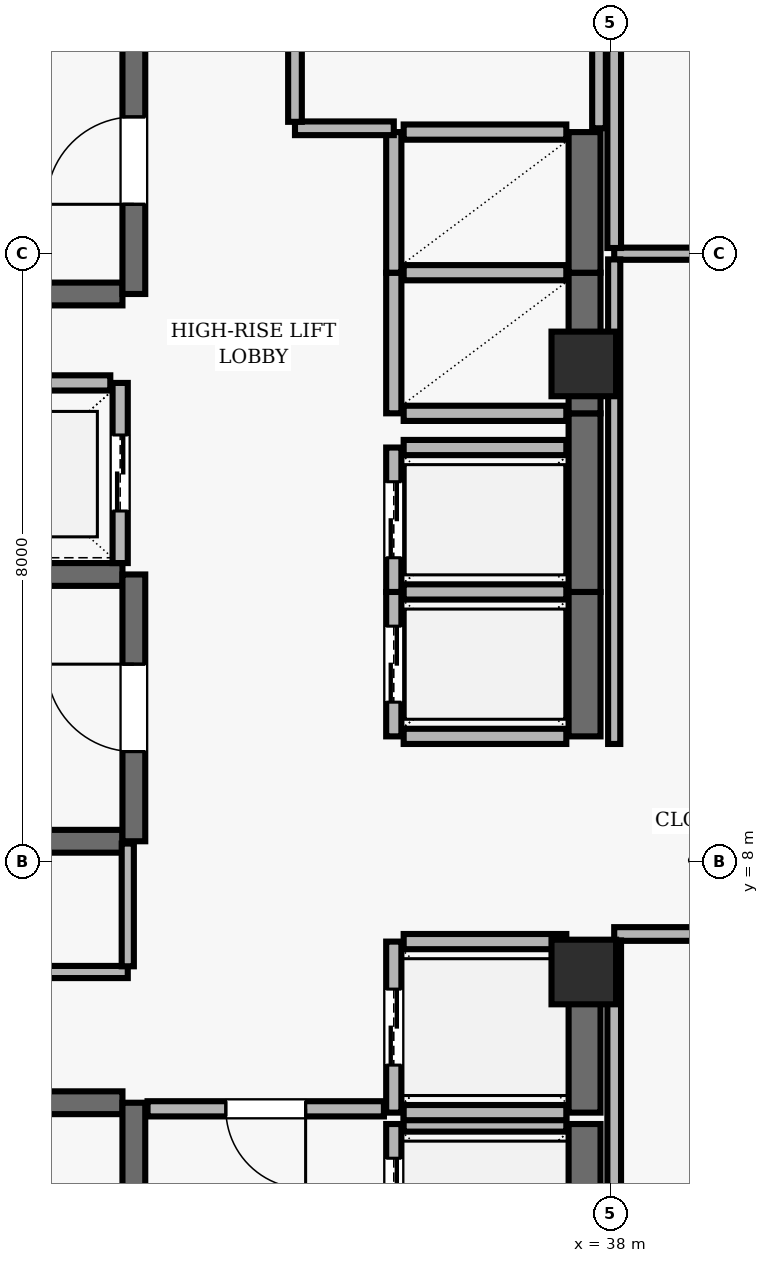
"""IFC4 building model, lengths in metres.
Left out: names, types, materials, properties, quantities, classifications, styles, units other than length and angle.
Written with IfcOpenShell. Run it as: python <this file> out.ifc"""

import sys

from ifc_helpers import new_model, si_unit, direction, frame, frame_2d, origin, origin_2d, place, context, subcontext, project, spatial, rectangle, extrude, element, fill, save


model = new_model("IFC4")
c1 = context("Model", 3, precision=1e-05, world=origin(), true_north=direction((0.0, 1.0)))
c2 = subcontext(c1, "Body", "Model", "MODEL_VIEW")
j1 = project(units=[si_unit("LENGTHUNIT", "METRE"), si_unit("PLANEANGLEUNIT", "RADIAN")], contexts=[c1])
p1 = place(None, origin())
s1 = spatial("IfcSite", under=j1, at=p1, CompositionType="ELEMENT")
p2 = place(p1, origin())
s2 = spatial("IfcBuilding", under=s1, at=p2, CompositionType="ELEMENT")
p3 = place(p2, frame((0.0, 0.0, 263.8)))
s3 = spatial("IfcBuildingStorey", under=s2, at=p3, CompositionType="ELEMENT", Elevation=263.8)
for number, where, z_axis, x_axis in (
    (1, (37.65, 6.55, 0.0), (0.0, 0.0, 1.0), (1.0, 0.0, 0.0)),
    (2, (37.65, 14.55, 0.0), (0.0, 0.0, 1.0), (1.0, 0.0, 0.0)),
):
    element("IfcColumn", number, at=place(p3, frame(where, z_axis=z_axis, x_axis=x_axis)), inside=s3, PredefinedType="COLUMN", context=c2, shape_type="SweptSolid", body=[
        extrude(rectangle(XDim=0.85, YDim=0.85, at=origin_2d()), origin(), (0.0, 0.0, 1.0), 3.9),
    ])
p4 = place(p3, frame((31.58, 4.83, 0.0), z_axis=(0.0, 0.0, 1.0), x_axis=(-1.0, 0.0, 0.0)))
e3 = element("IfcWall", 3, at=p4, inside=s3, PredefinedType="SHEAR", context=c2, shape_type="SweptSolid", body=[
    extrude(rectangle(XDim=8.36, YDim=0.3, at=frame_2d((4.18, 0.0))), origin(), (0.0, 0.0, 1.0), 3.69),
])
p5 = place(p3, frame((31.73, 0.96, 0.0), z_axis=(0.0, 0.0, 1.0), x_axis=(0.0, 1.0, 0.0)))
e4 = element("IfcWall", 4, at=p5, inside=s3, PredefinedType="SHEAR", context=c2, shape_type="SweptSolid", body=[
    extrude(rectangle(XDim=3.87, YDim=0.3, at=frame_2d((1.935, 0.0))), origin(), (0.0, 0.0, 1.0), 3.69),
])
p6 = place(p5, frame((1.54, 0.0, 0.0)))
e5 = element("IfcOpeningElement", 5, at=p6, cuts=e4, PredefinedType="OPENING", context=c2, shape_type="SweptSolid", body=[
    extrude(rectangle(XDim=1.15, YDim=2.15, at=frame_2d((0.575, 1.075))), frame((0.0, 0.16, 0.0), z_axis=(0.0, -1.0, 0.0), x_axis=(1.0, 0.0, 0.0)), (0.0, 0.0, 1.0), 0.32),
])
p7 = place(p3, frame((23.22, 15.47, 0.0), z_axis=(0.0, 0.0, 1.0), x_axis=(1.0, 0.0, 0.0)))
e6 = element("IfcWall", 6, at=p7, inside=s3, PredefinedType="SHEAR", context=c2, shape_type="SweptSolid", body=[
    extrude(rectangle(XDim=8.36, YDim=0.3, at=frame_2d((4.18, 0.0))), origin(), (0.0, 0.0, 1.0), 3.69),
])
p8 = place(p3, frame((31.73, 15.47, 0.0), z_axis=(0.0, 0.0, 1.0), x_axis=(0.0, 1.0, 0.0)))
e7 = element("IfcWall", 7, at=p8, inside=s3, PredefinedType="SHEAR", context=c2, shape_type="SweptSolid", body=[
    extrude(rectangle(XDim=3.51, YDim=0.3, at=frame_2d((1.755, 0.0))), origin(), (0.0, 0.0, 1.0), 3.69),
])
p9 = place(p8, frame((1.18, 0.0, 0.0)))
e8 = element("IfcOpeningElement", 8, at=p9, cuts=e7, PredefinedType="OPENING", context=c2, shape_type="SweptSolid", body=[
    extrude(rectangle(XDim=1.15, YDim=2.15, at=frame_2d((0.575, 1.075))), frame((0.0, 0.16, 0.0), z_axis=(0.0, -1.0, 0.0), x_axis=(1.0, 0.0, 0.0)), (0.0, 0.0, 1.0), 0.32),
])
for number, where, z_axis, x_axis in (
    (9, (31.58, 11.78, 0.0), (0.0, 0.0, 1.0), (-1.0, 0.0, 0.0)),
    (10, (23.22, 8.27, 0.0), (0.0, 0.0, 1.0), (1.0, 0.0, 0.0)),
):
    element("IfcWall", number, at=place(p3, frame(where, z_axis=z_axis, x_axis=x_axis)), inside=s3, PredefinedType="SHEAR", context=c2, shape_type="SweptSolid", body=[
        extrude(rectangle(XDim=8.36, YDim=0.3, at=frame_2d((4.18, 0.0))), origin(), (0.0, 0.0, 1.0), 3.69),
    ])
p10 = place(p3, frame((31.73, 8.27, 0.0), z_axis=(0.0, 0.0, 1.0), x_axis=(0.0, 1.0, 0.0)))
e11 = element("IfcWall", 11, at=p10, inside=s3, PredefinedType="SHEAR", context=c2, shape_type="SweptSolid", body=[
    extrude(rectangle(XDim=3.51, YDim=0.3, at=frame_2d((1.755, 0.0))), origin(), (0.0, 0.0, 1.0), 3.69),
])
p11 = place(p10, frame((1.18, 0.0, 0.0)))
e12 = element("IfcOpeningElement", 12, at=p11, cuts=e11, PredefinedType="OPENING", context=c2, shape_type="SweptSolid", body=[
    extrude(rectangle(XDim=1.15, YDim=2.15, at=frame_2d((0.575, 1.075))), frame((0.0, 0.16, 0.0), z_axis=(0.0, -1.0, 0.0), x_axis=(1.0, 0.0, 0.0)), (0.0, 0.0, 1.0), 0.32),
])
p12 = place(p3, frame((35.15, 4.55, 0.0), z_axis=(0.0, 0.0, 1.0), x_axis=(0.0, -1.0, 0.0)))
e13 = element("IfcWall", 13, at=p12, inside=s3, PredefinedType="SOLIDWALL", context=c2, shape_type="SweptSolid", body=[
    extrude(rectangle(XDim=2.1, YDim=0.2, at=frame_2d((1.05, 0.0))), origin(), (0.0, 0.0, 1.0), 3.69),
])
p13 = place(p12, frame((0.45, 0.0, 0.0)))
e14 = element("IfcOpeningElement", 14, at=p13, cuts=e13, PredefinedType="OPENING", context=c2, shape_type="SweptSolid", body=[
    extrude(rectangle(XDim=1.2, YDim=2.15, at=frame_2d((0.6, 1.075))), frame((0.0, 0.11, 0.0), z_axis=(0.0, -1.0, 0.0), x_axis=(1.0, 0.0, 0.0)), (0.0, 0.0, 1.0), 0.22),
])
p14 = place(p3, frame((37.66, 2.45, 0.0), z_axis=(0.0, 0.0, 1.0), x_axis=(0.0, 1.0, 0.0)))
e15 = element("IfcWall", 15, at=p14, inside=s3, PredefinedType="SHEAR", context=c2, shape_type="SweptSolid", body=[
    extrude(rectangle(XDim=2.1, YDim=0.42, at=frame_2d((1.05, 0.0))), origin(), (0.0, 0.0, 1.0), 3.69),
])
p15 = place(p3, frame((37.42, 4.55, 0.0), z_axis=(0.0, 0.0, 1.0), x_axis=(-1.0, 0.0, 0.0)))
e16 = element("IfcWall", 16, at=p15, inside=s3, PredefinedType="SOLIDWALL", context=c2, shape_type="SweptSolid", body=[
    extrude(rectangle(XDim=2.14, YDim=0.2, at=frame_2d((1.07, 0.0))), origin(), (0.0, 0.0, 1.0), 3.69),
])
p16 = place(p3, frame((35.15, 6.95, 0.0), z_axis=(0.0, 0.0, 1.0), x_axis=(0.0, -1.0, 0.0)))
e17 = element("IfcWall", 17, at=p16, inside=s3, PredefinedType="SOLIDWALL", context=c2, shape_type="SweptSolid", body=[
    extrude(rectangle(XDim=2.25, YDim=0.2, at=frame_2d((1.125, 0.0))), origin(), (0.0, 0.0, 1.0), 3.69),
])
p17 = place(p16, frame((0.625, 0.0, 0.0)))
e18 = element("IfcOpeningElement", 18, at=p17, cuts=e17, PredefinedType="OPENING", context=c2, shape_type="SweptSolid", body=[
    extrude(rectangle(XDim=1.0, YDim=2.1, at=frame_2d((0.5, 1.05))), frame((0.0, 0.11, 0.0), z_axis=(0.0, -1.0, 0.0), x_axis=(1.0, 0.0, 0.0)), (0.0, 0.0, 1.0), 0.22),
])
p18 = place(p3, frame((37.66, 4.7, 0.0), z_axis=(0.0, 0.0, 1.0), x_axis=(0.0, 1.0, 0.0)))
e19 = element("IfcWall", 19, at=p18, inside=s3, PredefinedType="SHEAR", context=c2, shape_type="SweptSolid", body=[
    extrude(rectangle(XDim=2.25, YDim=0.42, at=frame_2d((1.125, 0.0))), origin(), (0.0, 0.0, 1.0), 3.69),
])
for number, where, z_axis, x_axis in (
    (20, (35.28, 4.7, 0.0), (0.0, 0.0, 1.0), (1.0, 0.0, 0.0)),
    (21, (37.42, 6.95, 0.0), (0.0, 0.0, 1.0), (-1.0, 0.0, 0.0)),
):
    element("IfcWall", number, at=place(p3, frame(where, z_axis=z_axis, x_axis=x_axis)), inside=s3, PredefinedType="SOLIDWALL", context=c2, shape_type="SweptSolid", body=[
        extrude(rectangle(XDim=2.14, YDim=0.2, at=frame_2d((1.07, 0.0))), origin(), (0.0, 0.0, 1.0), 3.69),
    ])
p19 = place(p3, frame((35.15, 11.55, 0.0), z_axis=(0.0, 0.0, 1.0), x_axis=(0.0, -1.0, 0.0)))
e22 = element("IfcWall", 22, at=p19, inside=s3, PredefinedType="SOLIDWALL", context=c2, shape_type="SweptSolid", body=[
    extrude(rectangle(XDim=1.9, YDim=0.2, at=frame_2d((0.95, 0.0))), origin(), (0.0, 0.0, 1.0), 3.69),
])
p20 = place(p19, frame((0.45, 0.0, 0.0)))
e23 = element("IfcOpeningElement", 23, at=p20, cuts=e22, PredefinedType="OPENING", context=c2, shape_type="SweptSolid", body=[
    extrude(rectangle(XDim=1.0, YDim=2.1, at=frame_2d((0.5, 1.05))), frame((0.0, 0.11, 0.0), z_axis=(0.0, -1.0, 0.0), x_axis=(1.0, 0.0, 0.0)), (0.0, 0.0, 1.0), 0.22),
])
p21 = place(p3, frame((37.66, 9.65, 0.0), z_axis=(0.0, 0.0, 1.0), x_axis=(0.0, 1.0, 0.0)))
e24 = element("IfcWall", 24, at=p21, inside=s3, PredefinedType="SHEAR", context=c2, shape_type="SweptSolid", body=[
    extrude(rectangle(XDim=1.9, YDim=0.42, at=frame_2d((0.95, 0.0))), origin(), (0.0, 0.0, 1.0), 3.69),
])
for number, where, z_axis, x_axis in (
    (25, (35.28, 9.65, 0.0), (0.0, 0.0, 1.0), (1.0, 0.0, 0.0)),
    (26, (37.42, 11.55, 0.0), (0.0, 0.0, 1.0), (-1.0, 0.0, 0.0)),
):
    element("IfcWall", number, at=place(p3, frame(where, z_axis=z_axis, x_axis=x_axis)), inside=s3, PredefinedType="SOLIDWALL", context=c2, shape_type="SweptSolid", body=[
        extrude(rectangle(XDim=2.14, YDim=0.2, at=frame_2d((1.07, 0.0))), origin(), (0.0, 0.0, 1.0), 3.69),
    ])
p22 = place(p3, frame((35.15, 13.45, 0.0), z_axis=(0.0, 0.0, 1.0), x_axis=(0.0, -1.0, 0.0)))
e27 = element("IfcWall", 27, at=p22, inside=s3, PredefinedType="SOLIDWALL", context=c2, shape_type="SweptSolid", body=[
    extrude(rectangle(XDim=1.9, YDim=0.2, at=frame_2d((0.95, 0.0))), origin(), (0.0, 0.0, 1.0), 3.69),
])
p23 = place(p22, frame((0.45, 0.0, 0.0)))
e28 = element("IfcOpeningElement", 28, at=p23, cuts=e27, PredefinedType="OPENING", context=c2, shape_type="SweptSolid", body=[
    extrude(rectangle(XDim=1.0, YDim=2.1, at=frame_2d((0.5, 1.05))), frame((0.0, 0.11, 0.0), z_axis=(0.0, -1.0, 0.0), x_axis=(1.0, 0.0, 0.0)), (0.0, 0.0, 1.0), 0.22),
])
p24 = place(p3, frame((37.66, 11.55, 0.0), z_axis=(0.0, 0.0, 1.0), x_axis=(0.0, 1.0, 0.0)))
e29 = element("IfcWall", 29, at=p24, inside=s3, PredefinedType="SHEAR", context=c2, shape_type="SweptSolid", body=[
    extrude(rectangle(XDim=2.35, YDim=0.42, at=frame_2d((1.175, 0.0))), origin(), (0.0, 0.0, 1.0), 3.69),
])
p25 = place(p3, frame((37.42, 13.45, 0.0), z_axis=(0.0, 0.0, 1.0), x_axis=(-1.0, 0.0, 0.0)))
e30 = element("IfcWall", 30, at=p25, inside=s3, PredefinedType="SOLIDWALL", context=c2, shape_type="SweptSolid", body=[
    extrude(rectangle(XDim=2.14, YDim=0.2, at=frame_2d((1.07, 0.0))), origin(), (0.0, 0.0, 1.0), 3.69),
])
p26 = place(p3, frame((31.55, 11.93, 0.0), z_axis=(0.0, 0.0, 1.0), x_axis=(0.0, 1.0, 0.0)))
e31 = element("IfcWall", 31, at=p26, inside=s3, PredefinedType="SOLIDWALL", context=c2, shape_type="SweptSolid", body=[
    extrude(rectangle(XDim=2.37, YDim=0.2, at=frame_2d((1.185, 0.0))), origin(), (0.0, 0.0, 1.0), 3.69),
])
p27 = place(p26, frame((0.685, 0.0, 0.0)))
e32 = element("IfcOpeningElement", 32, at=p27, cuts=e31, PredefinedType="OPENING", context=c2, shape_type="SweptSolid", body=[
    extrude(rectangle(XDim=1.0, YDim=2.1, at=frame_2d((0.5, 1.05))), frame((0.0, 0.11, 0.0), z_axis=(0.0, -1.0, 0.0), x_axis=(1.0, 0.0, 0.0)), (0.0, 0.0, 1.0), 0.22),
])
p28 = place(p3, frame((31.42, 14.3, 0.0), z_axis=(0.0, 0.0, 1.0), x_axis=(-1.0, 0.0, 0.0)))
e33 = element("IfcWall", 33, at=p28, inside=s3, PredefinedType="SOLIDWALL", context=c2, shape_type="SweptSolid", body=[
    extrude(rectangle(XDim=2.44, YDim=0.2, at=frame_2d((1.22, 0.0))), origin(), (0.0, 0.0, 1.0), 3.69),
])
p29 = place(p3, frame((35.15, 15.75, 0.0), z_axis=(0.0, 0.0, 1.0), x_axis=(0.0, -1.0, 0.0)))
e34 = element("IfcWall", 34, at=p29, inside=s3, PredefinedType="SOLIDWALL", context=c2, shape_type="SweptSolid", body=[
    extrude(rectangle(XDim=1.85, YDim=0.2, at=frame_2d((0.925, 0.0))), origin(), (0.0, 0.0, 1.0), 3.69),
])
p30 = place(p3, frame((37.66, 13.9, 0.0), z_axis=(0.0, 0.0, 1.0), x_axis=(0.0, 1.0, 0.0)))
e35 = element("IfcWall", 35, at=p30, inside=s3, PredefinedType="SHEAR", context=c2, shape_type="SweptSolid", body=[
    extrude(rectangle(XDim=1.85, YDim=0.42, at=frame_2d((0.925, 0.0))), origin(), (0.0, 0.0, 1.0), 3.69),
])
for number, where, z_axis, x_axis in (
    (36, (35.28, 13.9, 0.0), (0.0, 0.0, 1.0), (1.0, 0.0, 0.0)),
    (37, (37.42, 15.75, 0.0), (0.0, 0.0, 1.0), (-1.0, 0.0, 0.0)),
):
    element("IfcWall", number, at=place(p3, frame(where, z_axis=z_axis, x_axis=x_axis)), inside=s3, PredefinedType="SOLIDWALL", context=c2, shape_type="SweptSolid", body=[
        extrude(rectangle(XDim=2.14, YDim=0.2, at=frame_2d((1.07, 0.0))), origin(), (0.0, 0.0, 1.0), 3.69),
    ])
p31 = place(p3, frame((35.15, 17.6, 0.0), z_axis=(0.0, 0.0, 1.0), x_axis=(0.0, -1.0, 0.0)))
e38 = element("IfcWall", 38, at=p31, inside=s3, PredefinedType="SOLIDWALL", context=c2, shape_type="SweptSolid", body=[
    extrude(rectangle(XDim=1.85, YDim=0.2, at=frame_2d((0.925, 0.0))), origin(), (0.0, 0.0, 1.0), 3.69),
])
p32 = place(p3, frame((37.66, 15.75, 0.0), z_axis=(0.0, 0.0, 1.0), x_axis=(0.0, 1.0, 0.0)))
e39 = element("IfcWall", 39, at=p32, inside=s3, PredefinedType="SHEAR", context=c2, shape_type="SweptSolid", body=[
    extrude(rectangle(XDim=1.85, YDim=0.42, at=frame_2d((0.925, 0.0))), origin(), (0.0, 0.0, 1.0), 3.69),
])
p33 = place(p3, frame((37.42, 17.6, 0.0), z_axis=(0.0, 0.0, 1.0), x_axis=(-1.0, 0.0, 0.0)))
e40 = element("IfcWall", 40, at=p33, inside=s3, PredefinedType="SOLIDWALL", context=c2, shape_type="SweptSolid", body=[
    extrude(rectangle(XDim=2.14, YDim=0.2, at=frame_2d((1.07, 0.0))), origin(), (0.0, 0.0, 1.0), 3.69),
])
p34 = place(p3, frame((31.65, 6.55, 0.0), z_axis=(0.0, 0.0, 1.0), x_axis=(-1.0, 0.0, 0.0)))
e41 = element("IfcWall", 41, at=p34, inside=s3, PredefinedType="PARTITIONING", context=c2, shape_type="SweptSolid", body=[
    extrude(rectangle(XDim=4.75, YDim=0.16, at=frame_2d((2.375, 0.0))), origin(), (0.0, 0.0, 1.0), 3.69),
])
p35 = place(p34, frame((1.935, 0.0, 0.0)))
e42 = element("IfcOpeningElement", 42, at=p35, cuts=e41, PredefinedType="OPENING", context=c2, shape_type="SweptSolid", body=[
    extrude(rectangle(XDim=0.88, YDim=2.1, at=frame_2d((0.44, 1.05))), frame((0.0, 0.09, 0.0), z_axis=(0.0, -1.0, 0.0), x_axis=(1.0, 0.0, 0.0)), (0.0, 0.0, 1.0), 0.18),
])
p36 = place(p3, frame((33.85, 17.65, 0.0), z_axis=(0.0, 0.0, 1.0), x_axis=(1.0, 0.0, 0.0)))
e43 = element("IfcWall", 43, at=p36, inside=s3, PredefinedType="PARTITIONING", context=c2, shape_type="SweptSolid", body=[
    extrude(rectangle(XDim=1.3, YDim=0.18, at=frame_2d((0.65, 0.0))), origin(), (0.0, 0.0, 1.0), 3.69),
])
p37 = place(p3, frame((35.02, 4.75, 0.0), z_axis=(0.0, 0.0, 1.0), x_axis=(-1.0, 0.0, 0.0)))
e44 = element("IfcWall", 44, at=p37, inside=s3, PredefinedType="SOLIDWALL", context=c2, shape_type="SweptSolid", body=[
    extrude(rectangle(XDim=3.11, YDim=0.2, at=frame_2d((1.555, 0.0))), origin(), (0.0, 0.0, 1.0), 3.69),
])
p38 = place(p37, frame((1.03, 0.0, 0.0)))
e45 = element("IfcOpeningElement", 45, at=p38, cuts=e44, PredefinedType="OPENING", context=c2, shape_type="SweptSolid", body=[
    extrude(rectangle(XDim=1.05, YDim=2.15, at=frame_2d((0.525, 1.075))), frame((0.0, 0.11, 0.0), z_axis=(0.0, -1.0, 0.0), x_axis=(1.0, 0.0, 0.0)), (0.0, 0.0, 1.0), 0.22),
])
p39 = place(p3, frame((38.05, 7.05, 0.0), z_axis=(0.0, 0.0, 1.0), x_axis=(1.0, 0.0, 0.0)))
e46 = element("IfcWall", 46, at=p39, inside=s3, PredefinedType="PARTITIONING", context=c2, shape_type="SweptSolid", body=[
    extrude(rectangle(XDim=5.35, YDim=0.18, at=frame_2d((2.675, 0.0))), origin(), (0.0, 0.0, 1.0), 3.69),
])
p40 = place(p39, frame((2.2, 0.0, 0.0)))
e47 = element("IfcOpeningElement", 47, at=p40, cuts=e46, PredefinedType="OPENING", context=c2, shape_type="SweptSolid", body=[
    extrude(rectangle(XDim=0.95, YDim=2.1, at=frame_2d((0.475, 1.05))), frame((0.0, 0.1, 0.0), z_axis=(0.0, -1.0, 0.0), x_axis=(1.0, 0.0, 0.0)), (0.0, 0.0, 1.0), 0.2),
])
p41 = place(p3, frame((43.4, 16.0, 0.0), z_axis=(0.0, 0.0, 1.0), x_axis=(-1.0, 0.0, 0.0)))
e48 = element("IfcWall", 48, at=p41, inside=s3, PredefinedType="PARTITIONING", context=c2, shape_type="SweptSolid", body=[
    extrude(rectangle(XDim=5.35, YDim=0.16, at=frame_2d((2.675, 0.0))), origin(), (0.0, 0.0, 1.0), 3.39),
])
p42 = place(p41, frame((2.225, 0.0, 0.0)))
e49 = element("IfcOpeningElement", 49, at=p42, cuts=e48, PredefinedType="OPENING", context=c2, shape_type="SweptSolid", body=[
    extrude(rectangle(XDim=0.9, YDim=2.1, at=frame_2d((0.45, 1.05))), frame((0.0, 0.09, 0.0), z_axis=(0.0, -1.0, 0.0), x_axis=(1.0, 0.0, 0.0)), (0.0, 0.0, 1.0), 0.18),
])
p43 = place(p3, frame((31.65, 8.24, 0.0), z_axis=(0.0, 0.0, 1.0), x_axis=(0.0, -1.0, 0.0)))
e50 = element("IfcWall", 50, at=p43, inside=s3, PredefinedType="PARTITIONING", context=c2, shape_type="SweptSolid", body=[
    extrude(rectangle(XDim=1.615, YDim=0.16, at=frame_2d((0.808, 0.0))), origin(), (0.0, 0.0, 1.0), 3.69),
])
p44 = place(p3, frame((33.85, 17.735, 0.0), z_axis=(0.0, 0.0, 1.0), x_axis=(0.0, 1.0, 0.0)))
e51 = element("IfcWall", 51, at=p44, inside=s3, PredefinedType="PARTITIONING", context=c2, shape_type="SweptSolid", body=[
    extrude(rectangle(XDim=2.93, YDim=0.18, at=frame_2d((1.465, 0.0))), origin(), (0.0, 0.0, 1.0), 3.69),
])
p45 = place(p44, frame((0.99, 0.0, 0.0)))
e52 = element("IfcOpeningElement", 52, at=p45, cuts=e51, PredefinedType="OPENING", context=c2, shape_type="SweptSolid", body=[
    extrude(rectangle(XDim=0.95, YDim=2.1, at=frame_2d((0.475, 1.05))), frame((0.0, 0.1, 0.0), z_axis=(0.0, -1.0, 0.0), x_axis=(1.0, 0.0, 0.0)), (0.0, 0.0, 1.0), 0.2),
])
p46 = place(p3, frame((37.85, 17.65, 0.0), z_axis=(0.0, 0.0, 1.0), x_axis=(0.0, 1.0, 0.0)))
e53 = element("IfcWall", 53, at=p46, inside=s3, PredefinedType="PARTITIONING", context=c2, shape_type="SweptSolid", body=[
    extrude(rectangle(XDim=3.015, YDim=0.18, at=frame_2d((1.508, 0.0))), origin(), (0.0, 0.0, 1.0), 3.221),
])
p47 = place(p3, frame((38.05, 6.965, 0.0), z_axis=(0.0, 0.0, 1.0), x_axis=(0.0, -1.0, 0.0)))
e54 = element("IfcWall", 54, at=p47, inside=s3, PredefinedType="PARTITIONING", context=c2, shape_type="SweptSolid", body=[
    extrude(rectangle(XDim=6.832, YDim=0.18, at=frame_2d((3.416, 0.0))), origin(), (0.0, 0.0, 1.0), 3.221),
])
p48 = place(p3, frame((38.05, 15.925, 0.0), z_axis=(0.0, 0.0, 1.0), x_axis=(0.0, -1.0, 0.0)))
e55 = element("IfcWall", 55, at=p48, inside=s3, PredefinedType="PARTITIONING", context=c2, shape_type="SweptSolid", body=[
    extrude(rectangle(XDim=6.375, YDim=0.16, at=frame_2d((3.188, 0.0))), origin(), (0.0, 0.0, 1.0), 3.221),
])
p49 = place(p3, frame((38.05, 23.918, 0.0), z_axis=(0.0, 0.0, 1.0), x_axis=(0.0, -1.0, 0.0)))
e56 = element("IfcWall", 56, at=p49, inside=s3, PredefinedType="PARTITIONING", context=c2, shape_type="SweptSolid", body=[
    extrude(rectangle(XDim=7.843, YDim=0.18, at=frame_2d((3.921, 0.0))), origin(), (0.0, 0.0, 1.0), 3.221),
])
p50 = place(p9, origin())
e57 = element("IfcDoor", 57, at=p50, inside=s3, OperationType="SINGLE_SWING_LEFT", PredefinedType="DOOR", context=c2, shape_type="SweptSolid", body=[
    extrude(rectangle(XDim=1.15, YDim=2.15, at=frame_2d((0.575, 1.075))), frame((0.0, 0.025, 0.0), z_axis=(0.0, -1.0, 0.0), x_axis=(1.0, 0.0, 0.0)), (0.0, 0.0, 1.0), 0.05),
])
fill(e8, e57)
p51 = place(p11, origin())
e58 = element("IfcDoor", 58, at=p51, inside=s3, OperationType="SINGLE_SWING_RIGHT", PredefinedType="DOOR", context=c2, shape_type="SweptSolid", body=[
    extrude(rectangle(XDim=1.15, YDim=2.15, at=frame_2d((0.575, 1.075))), frame((0.0, 0.025, 0.0), z_axis=(0.0, -1.0, 0.0), x_axis=(1.0, 0.0, 0.0)), (0.0, 0.0, 1.0), 0.05),
])
fill(e12, e58)
p52 = place(p13, origin())
e59 = element("IfcDoor", 59, at=p52, inside=s3, OperationType="DOUBLE_DOOR_SLIDING", PredefinedType="DOOR", context=c2, shape_type="SweptSolid", body=[
    extrude(rectangle(XDim=1.2, YDim=2.15, at=frame_2d((0.6, 1.075))), frame((0.0, 0.025, 0.0), z_axis=(0.0, -1.0, 0.0), x_axis=(1.0, 0.0, 0.0)), (0.0, 0.0, 1.0), 0.05),
])
fill(e14, e59)
p53 = place(p17, origin())
e60 = element("IfcDoor", 60, at=p53, inside=s3, OperationType="DOUBLE_DOOR_SLIDING", PredefinedType="DOOR", context=c2, shape_type="SweptSolid", body=[
    extrude(rectangle(XDim=1.0, YDim=2.1, at=frame_2d((0.5, 1.05))), frame((0.0, 0.025, 0.0), z_axis=(0.0, -1.0, 0.0), x_axis=(1.0, 0.0, 0.0)), (0.0, 0.0, 1.0), 0.05),
])
fill(e18, e60)
p54 = place(p20, origin())
e61 = element("IfcDoor", 61, at=p54, inside=s3, OperationType="DOUBLE_DOOR_SLIDING", PredefinedType="DOOR", context=c2, shape_type="SweptSolid", body=[
    extrude(rectangle(XDim=1.0, YDim=2.1, at=frame_2d((0.5, 1.05))), frame((0.0, 0.025, 0.0), z_axis=(0.0, -1.0, 0.0), x_axis=(1.0, 0.0, 0.0)), (0.0, 0.0, 1.0), 0.05),
])
fill(e23, e61)
p55 = place(p23, origin())
e62 = element("IfcDoor", 62, at=p55, inside=s3, OperationType="DOUBLE_DOOR_SLIDING", PredefinedType="DOOR", context=c2, shape_type="SweptSolid", body=[
    extrude(rectangle(XDim=1.0, YDim=2.1, at=frame_2d((0.5, 1.05))), frame((0.0, 0.025, 0.0), z_axis=(0.0, -1.0, 0.0), x_axis=(1.0, 0.0, 0.0)), (0.0, 0.0, 1.0), 0.05),
])
fill(e28, e62)
p56 = place(p27, origin())
e63 = element("IfcDoor", 63, at=p56, inside=s3, OperationType="DOUBLE_DOOR_SLIDING", PredefinedType="DOOR", context=c2, shape_type="SweptSolid", body=[
    extrude(rectangle(XDim=1.0, YDim=2.1, at=frame_2d((0.5, 1.05))), frame((0.0, 0.025, 0.0), z_axis=(0.0, -1.0, 0.0), x_axis=(1.0, 0.0, 0.0)), (0.0, 0.0, 1.0), 0.05),
])
fill(e32, e63)
p57 = place(p38, origin())
e64 = element("IfcDoor", 64, at=p57, inside=s3, OperationType="SINGLE_SWING_LEFT", PredefinedType="DOOR", context=c2, shape_type="SweptSolid", body=[
    extrude(rectangle(XDim=1.05, YDim=2.15, at=frame_2d((0.525, 1.075))), frame((0.0, 0.025, 0.0), z_axis=(0.0, -1.0, 0.0), x_axis=(1.0, 0.0, 0.0)), (0.0, 0.0, 1.0), 0.05),
])
fill(e45, e64)
save(model, sys.argv[1])
